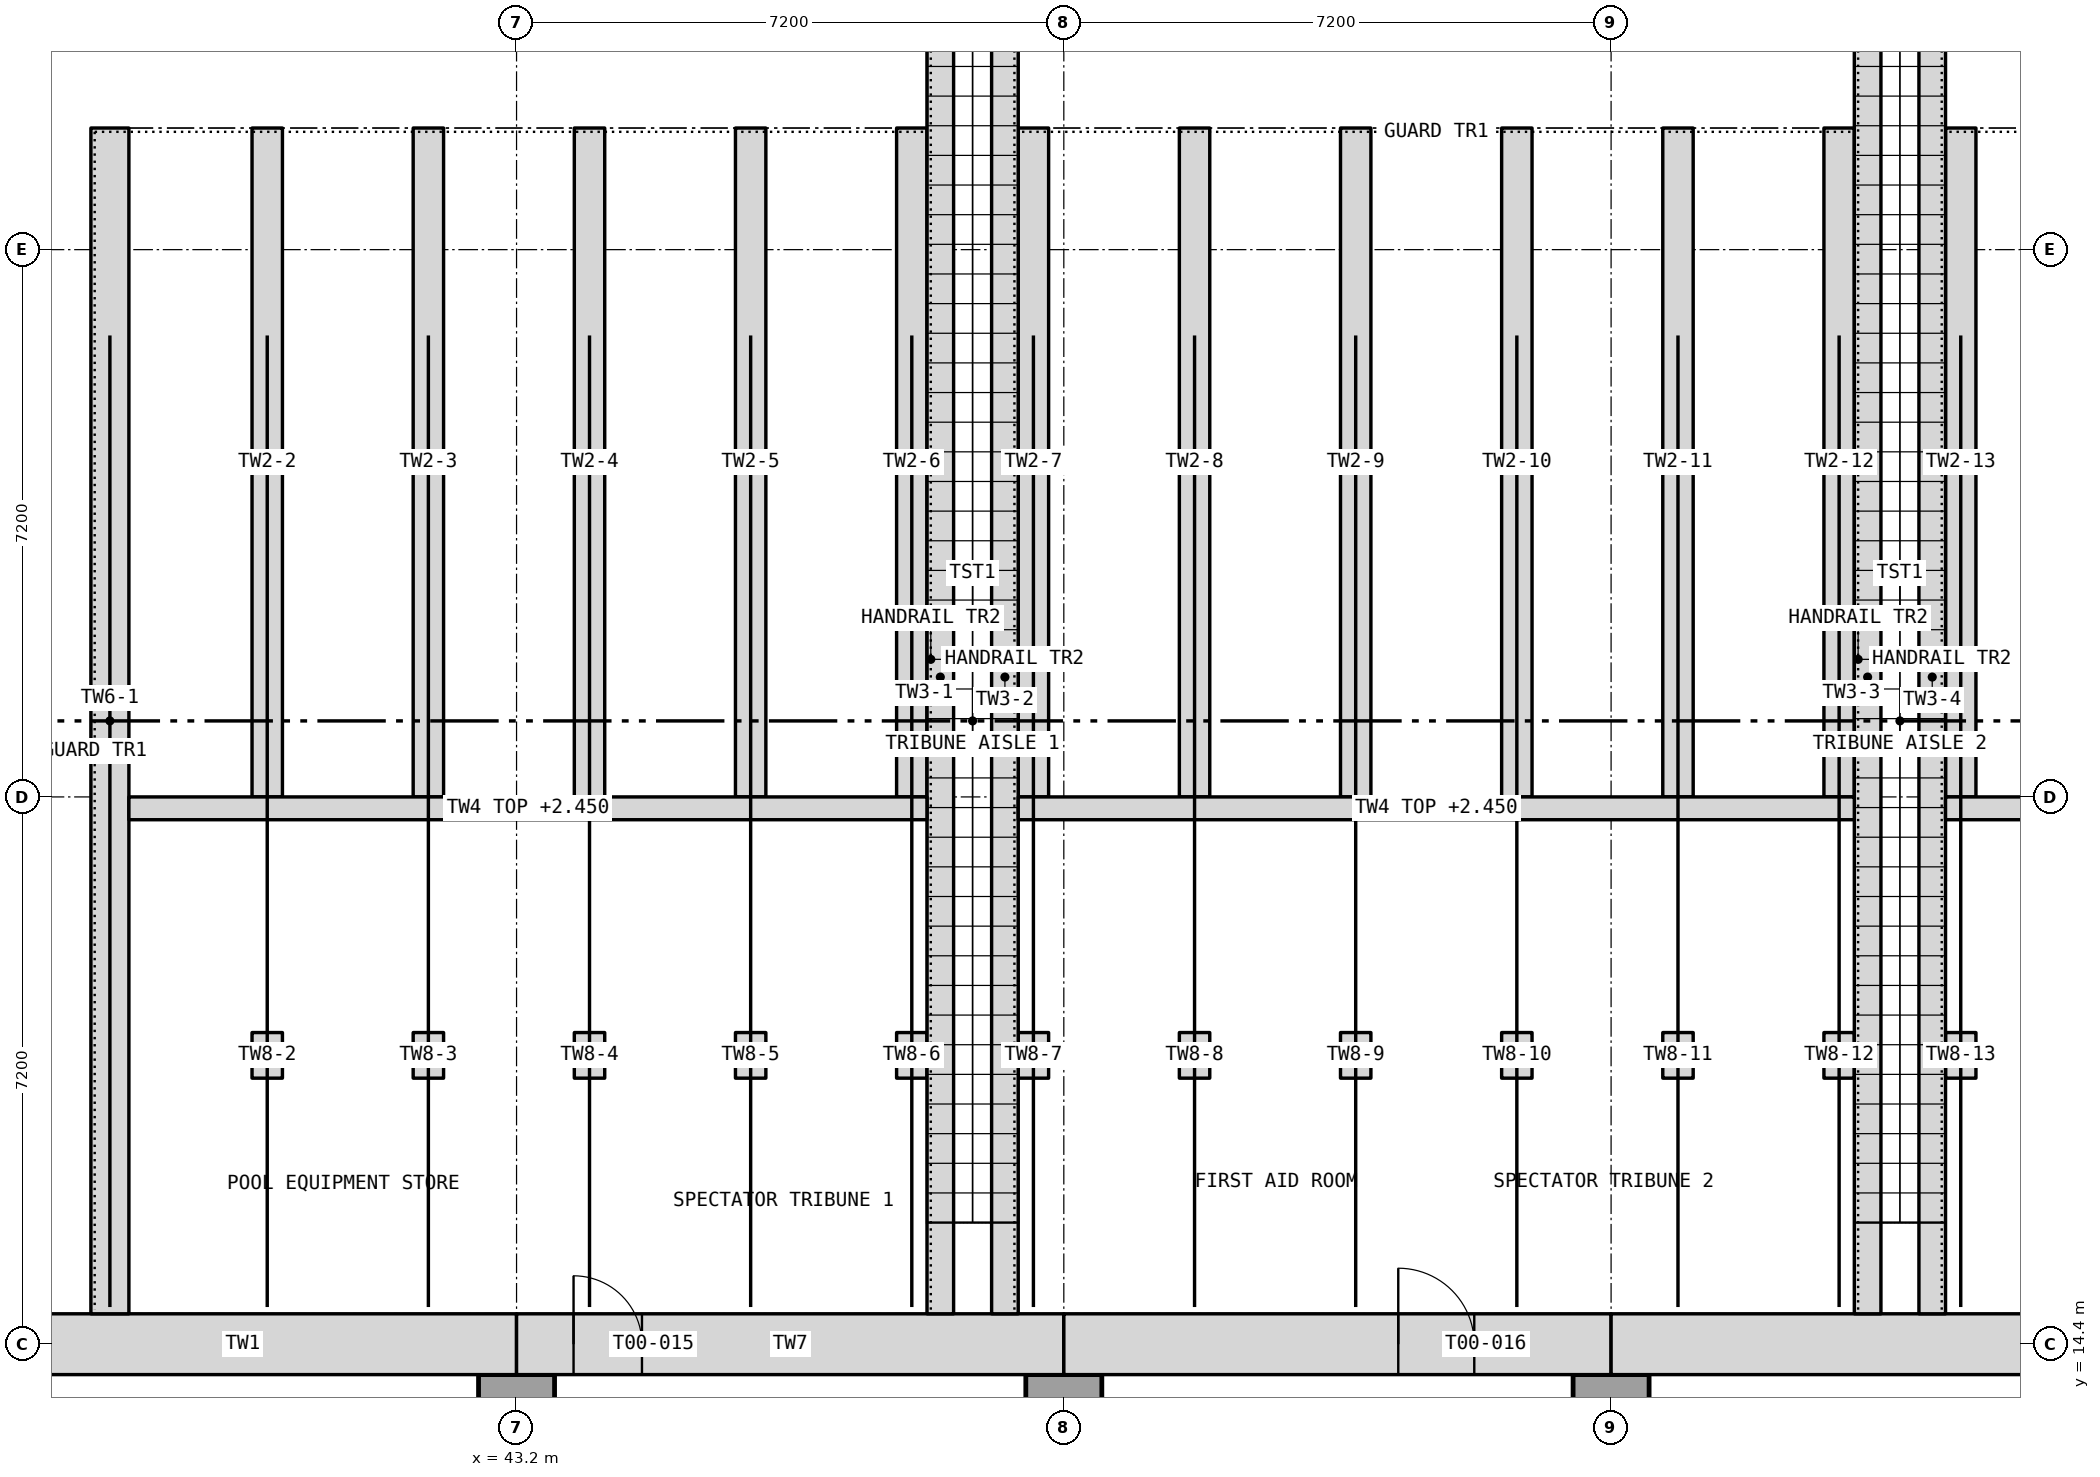
"""IFC4 building model, lengths in metres.
Left out: names, types, materials, properties, quantities, classifications, styles, units other than length and angle.
Written with IfcOpenShell. Run it as: python <this file> out.ifc"""

import sys

from ifc_helpers import new_model, si_unit, direction, frame, frame_2d, origin, place, context, subcontext, project, spatial, polyline, rectangle, outline, extrude, element, fill, save


model = new_model("IFC4")
c1 = context("Model", 3, precision=1e-05, world=origin(), true_north=direction((0.0, 1.0)))
c2 = subcontext(c1, "Body", "Model", "MODEL_VIEW")
j1 = project(units=[si_unit("LENGTHUNIT", "METRE"), si_unit("PLANEANGLEUNIT", "RADIAN")], contexts=[c1])
p1 = place(None, origin())
s1 = spatial("IfcSite", under=j1, at=p1, CompositionType="ELEMENT")
p2 = place(p1, origin())
s2 = spatial("IfcBuilding", under=s1, at=p2, CompositionType="ELEMENT")
p3 = place(p2, origin())
s3 = spatial("IfcBuildingStorey", under=s2, at=p3, CompositionType="ELEMENT", Elevation=0.0)
for number, where, z_axis, x_axis in (
    (1, (43.2, 11.4, 0.0), (0.0, 0.0, 1.0), (0.0, 1.0, 0.0)),
    (2, (50.4, 11.4, 0.0), (0.0, 0.0, 1.0), (0.0, 1.0, 0.0)),
):
    element("IfcWall", number, at=place(p3, frame(where, z_axis=z_axis, x_axis=x_axis)), inside=s3, PredefinedType="SOLIDWALL", context=c2, shape_type="SweptSolid", body=[
        extrude(rectangle(XDim=2.6, YDim=1.0, at=frame_2d((1.3, 0.0))), origin(), (0.0, 0.0, 1.0), 6.0),
    ])
p4 = place(p3, frame((57.6, 11.3, 0.0), z_axis=(0.0, 0.0, 1.0), x_axis=(0.0, 1.0, 0.0)))
e3 = element("IfcWall", 3, at=p4, inside=s3, PredefinedType="SOLIDWALL", context=c2, shape_type="SweptSolid", body=[
    extrude(rectangle(XDim=2.7, YDim=1.0, at=frame_2d((1.35, 0.0))), origin(), (0.0, 0.0, 1.0), 6.0),
])
p5 = place(p3, frame((36.0, 14.4, 0.0), z_axis=(0.0, 0.0, 1.0), x_axis=(1.0, 0.0, 0.0)))
e4 = element("IfcWall", 4, at=p5, inside=s3, PredefinedType="SOLIDWALL", context=c2, shape_type="SweptSolid", body=[
    extrude(rectangle(XDim=7.2, YDim=0.8, at=frame_2d((3.6, 0.0))), origin(), (0.0, 0.0, 1.0), 6.0),
])
p6 = place(p3, frame((43.2, 14.4, 0.0), z_axis=(0.0, 0.0, 1.0), x_axis=(1.0, 0.0, 0.0)))
e5 = element("IfcWall", 5, at=p6, inside=s3, PredefinedType="SOLIDWALL", context=c2, shape_type="SweptSolid", body=[
    extrude(rectangle(XDim=7.2, YDim=0.8, at=frame_2d((3.6, 0.0))), origin(), (0.0, 0.0, 1.0), 6.0),
])
p7 = place(p6, frame((0.75, 0.0, 0.0)))
e6 = element("IfcOpeningElement", 6, at=p7, cuts=e5, PredefinedType="OPENING", context=c2, shape_type="SweptSolid", body=[
    extrude(rectangle(XDim=0.9, YDim=2.1, at=frame_2d((0.45, 1.05))), frame((0.0, 0.41, 0.0), z_axis=(0.0, -1.0, 0.0), x_axis=(1.0, 0.0, 0.0)), (0.0, 0.0, 1.0), 0.82),
])
p8 = place(p3, frame((50.4, 14.4, 0.0), z_axis=(0.0, 0.0, 1.0), x_axis=(1.0, 0.0, 0.0)))
e7 = element("IfcWall", 7, at=p8, inside=s3, PredefinedType="SOLIDWALL", context=c2, shape_type="SweptSolid", body=[
    extrude(rectangle(XDim=7.2, YDim=0.8, at=frame_2d((3.6, 0.0))), origin(), (0.0, 0.0, 1.0), 6.0),
])
p9 = place(p8, frame((4.4, 0.0, 0.0)))
e8 = element("IfcOpeningElement", 8, at=p9, cuts=e7, PredefinedType="OPENING", context=c2, shape_type="SweptSolid", body=[
    extrude(rectangle(XDim=1.0, YDim=2.1, at=frame_2d((0.5, 1.05))), frame((0.0, 0.41, 0.0), z_axis=(0.0, -1.0, 0.0), x_axis=(1.0, 0.0, 0.0)), (0.0, 0.0, 1.0), 0.82),
])
p10 = place(p3, frame((57.6, 14.4, 0.0), z_axis=(0.0, 0.0, 1.0), x_axis=(1.0, 0.0, 0.0)))
e9 = element("IfcWall", 9, at=p10, inside=s3, PredefinedType="SOLIDWALL", context=c2, shape_type="SweptSolid", body=[
    extrude(rectangle(XDim=7.2, YDim=0.8, at=frame_2d((3.6, 0.0))), origin(), (0.0, 0.0, 1.0), 6.0),
])
p11 = place(p3, frame((37.85, 30.4, 0.0), z_axis=(0.0, 0.0, 1.0), x_axis=(0.0, -1.0, 0.0)))
e10 = element("IfcWall", 10, at=p11, inside=s3, PredefinedType="SOLIDWALL", context=c2, shape_type="SweptSolid", body=[
    extrude(outline(polyline([(0.0, 0.0), (15.6, 0.0), (15.6, 4.937), (2.6, 0.175), (2.6, 0.974), (0.0, 0.021), (0.0, 0.0)])), frame((0.0, 0.25, 0.0), z_axis=(0.0, -1.0, 0.0), x_axis=(1.0, 0.0, 0.0)), (0.0, 0.0, 1.0), 0.5),
])
p12 = place(p3, frame((39.92, 30.4, 0.0), z_axis=(0.0, 0.0, 1.0), x_axis=(0.0, -1.0, 0.0)))
e11 = element("IfcWall", 11, at=p12, inside=s3, PredefinedType="SOLIDWALL", context=c2, shape_type="SweptSolid", body=[
    extrude(outline(polyline([(0.0, 0.0), (8.8, 0.0), (8.8, 2.446), (2.6, 0.175), (2.6, 0.974), (0.0, 0.021), (0.0, 0.0)])), frame((0.0, 0.2, 0.0), z_axis=(0.0, -1.0, 0.0), x_axis=(1.0, 0.0, 0.0)), (0.0, 0.0, 1.0), 0.4),
])
p13 = place(p3, frame((39.92, 18.5, 0.0), z_axis=(0.0, 0.0, 1.0), x_axis=(0.0, -1.0, 0.0)))
e12 = element("IfcWall", 12, at=p13, inside=s3, PredefinedType="SOLIDWALL", context=c2, shape_type="SweptSolid", body=[
    extrude(outline(polyline([(0.0, 0.0), (0.6, 0.0), (0.6, 3.802), (0.0, 3.582), (0.0, 0.0)])), frame((0.0, 0.2, 0.0), z_axis=(0.0, -1.0, 0.0), x_axis=(1.0, 0.0, 0.0)), (0.0, 0.0, 1.0), 0.4),
])
p14 = place(p3, frame((42.04, 30.4, 0.0), z_axis=(0.0, 0.0, 1.0), x_axis=(0.0, -1.0, 0.0)))
e13 = element("IfcWall", 13, at=p14, inside=s3, PredefinedType="SOLIDWALL", context=c2, shape_type="SweptSolid", body=[
    extrude(outline(polyline([(0.0, 0.0), (8.8, 0.0), (8.8, 2.446), (2.6, 0.175), (2.6, 0.974), (0.0, 0.021), (0.0, 0.0)])), frame((0.0, 0.2, 0.0), z_axis=(0.0, -1.0, 0.0), x_axis=(1.0, 0.0, 0.0)), (0.0, 0.0, 1.0), 0.4),
])
p15 = place(p3, frame((42.04, 18.5, 0.0), z_axis=(0.0, 0.0, 1.0), x_axis=(0.0, -1.0, 0.0)))
e14 = element("IfcWall", 14, at=p15, inside=s3, PredefinedType="SOLIDWALL", context=c2, shape_type="SweptSolid", body=[
    extrude(outline(polyline([(0.0, 0.0), (0.6, 0.0), (0.6, 3.802), (0.0, 3.582), (0.0, 0.0)])), frame((0.0, 0.2, 0.0), z_axis=(0.0, -1.0, 0.0), x_axis=(1.0, 0.0, 0.0)), (0.0, 0.0, 1.0), 0.4),
])
p16 = place(p3, frame((44.16, 30.4, 0.0), z_axis=(0.0, 0.0, 1.0), x_axis=(0.0, -1.0, 0.0)))
e15 = element("IfcWall", 15, at=p16, inside=s3, PredefinedType="SOLIDWALL", context=c2, shape_type="SweptSolid", body=[
    extrude(outline(polyline([(0.0, 0.0), (8.8, 0.0), (8.8, 2.446), (2.6, 0.175), (2.6, 0.974), (0.0, 0.021), (0.0, 0.0)])), frame((0.0, 0.2, 0.0), z_axis=(0.0, -1.0, 0.0), x_axis=(1.0, 0.0, 0.0)), (0.0, 0.0, 1.0), 0.4),
])
p17 = place(p3, frame((44.16, 18.5, 0.0), z_axis=(0.0, 0.0, 1.0), x_axis=(0.0, -1.0, 0.0)))
e16 = element("IfcWall", 16, at=p17, inside=s3, PredefinedType="SOLIDWALL", context=c2, shape_type="SweptSolid", body=[
    extrude(outline(polyline([(0.0, 0.0), (0.6, 0.0), (0.6, 3.802), (0.0, 3.582), (0.0, 0.0)])), frame((0.0, 0.2, 0.0), z_axis=(0.0, -1.0, 0.0), x_axis=(1.0, 0.0, 0.0)), (0.0, 0.0, 1.0), 0.4),
])
p18 = place(p3, frame((46.28, 30.4, 0.0), z_axis=(0.0, 0.0, 1.0), x_axis=(0.0, -1.0, 0.0)))
e17 = element("IfcWall", 17, at=p18, inside=s3, PredefinedType="SOLIDWALL", context=c2, shape_type="SweptSolid", body=[
    extrude(outline(polyline([(0.0, 0.0), (8.8, 0.0), (8.8, 2.446), (2.6, 0.175), (2.6, 0.974), (0.0, 0.021), (0.0, 0.0)])), frame((0.0, 0.2, 0.0), z_axis=(0.0, -1.0, 0.0), x_axis=(1.0, 0.0, 0.0)), (0.0, 0.0, 1.0), 0.4),
])
p19 = place(p3, frame((46.28, 18.5, 0.0), z_axis=(0.0, 0.0, 1.0), x_axis=(0.0, -1.0, 0.0)))
e18 = element("IfcWall", 18, at=p19, inside=s3, PredefinedType="SOLIDWALL", context=c2, shape_type="SweptSolid", body=[
    extrude(outline(polyline([(0.0, 0.0), (0.6, 0.0), (0.6, 3.802), (0.0, 3.582), (0.0, 0.0)])), frame((0.0, 0.2, 0.0), z_axis=(0.0, -1.0, 0.0), x_axis=(1.0, 0.0, 0.0)), (0.0, 0.0, 1.0), 0.4),
])
p20 = place(p3, frame((48.4, 30.4, 0.0), z_axis=(0.0, 0.0, 1.0), x_axis=(0.0, -1.0, 0.0)))
e19 = element("IfcWall", 19, at=p20, inside=s3, PredefinedType="SOLIDWALL", context=c2, shape_type="SweptSolid", body=[
    extrude(outline(polyline([(0.0, 0.0), (8.8, 0.0), (8.8, 2.446), (2.6, 0.175), (2.6, 0.974), (0.0, 0.021), (0.0, 0.0)])), frame((0.0, 0.2, 0.0), z_axis=(0.0, -1.0, 0.0), x_axis=(1.0, 0.0, 0.0)), (0.0, 0.0, 1.0), 0.4),
])
p21 = place(p3, frame((48.4, 18.5, 0.0), z_axis=(0.0, 0.0, 1.0), x_axis=(0.0, -1.0, 0.0)))
e20 = element("IfcWall", 20, at=p21, inside=s3, PredefinedType="SOLIDWALL", context=c2, shape_type="SweptSolid", body=[
    extrude(outline(polyline([(0.0, 0.0), (0.6, 0.0), (0.6, 3.802), (0.0, 3.582), (0.0, 0.0)])), frame((0.0, 0.2, 0.0), z_axis=(0.0, -1.0, 0.0), x_axis=(1.0, 0.0, 0.0)), (0.0, 0.0, 1.0), 0.4),
])
p22 = place(p3, frame((50.0, 30.4, 0.0), z_axis=(0.0, 0.0, 1.0), x_axis=(0.0, -1.0, 0.0)))
e21 = element("IfcWall", 21, at=p22, inside=s3, PredefinedType="SOLIDWALL", context=c2, shape_type="SweptSolid", body=[
    extrude(outline(polyline([(0.0, 0.0), (8.8, 0.0), (8.8, 2.446), (2.6, 0.175), (2.6, 0.974), (0.0, 0.021), (0.0, 0.0)])), frame((0.0, 0.2, 0.0), z_axis=(0.0, -1.0, 0.0), x_axis=(1.0, 0.0, 0.0)), (0.0, 0.0, 1.0), 0.4),
])
p23 = place(p3, frame((50.0, 18.5, 0.0), z_axis=(0.0, 0.0, 1.0), x_axis=(0.0, -1.0, 0.0)))
e22 = element("IfcWall", 22, at=p23, inside=s3, PredefinedType="SOLIDWALL", context=c2, shape_type="SweptSolid", body=[
    extrude(outline(polyline([(0.0, 0.0), (0.6, 0.0), (0.6, 3.802), (0.0, 3.582), (0.0, 0.0)])), frame((0.0, 0.2, 0.0), z_axis=(0.0, -1.0, 0.0), x_axis=(1.0, 0.0, 0.0)), (0.0, 0.0, 1.0), 0.4),
])
p24 = place(p3, frame((52.12, 30.4, 0.0), z_axis=(0.0, 0.0, 1.0), x_axis=(0.0, -1.0, 0.0)))
e23 = element("IfcWall", 23, at=p24, inside=s3, PredefinedType="SOLIDWALL", context=c2, shape_type="SweptSolid", body=[
    extrude(outline(polyline([(0.0, 0.0), (8.8, 0.0), (8.8, 2.446), (2.6, 0.175), (2.6, 0.974), (0.0, 0.021), (0.0, 0.0)])), frame((0.0, 0.2, 0.0), z_axis=(0.0, -1.0, 0.0), x_axis=(1.0, 0.0, 0.0)), (0.0, 0.0, 1.0), 0.4),
])
p25 = place(p3, frame((52.12, 18.5, 0.0), z_axis=(0.0, 0.0, 1.0), x_axis=(0.0, -1.0, 0.0)))
e24 = element("IfcWall", 24, at=p25, inside=s3, PredefinedType="SOLIDWALL", context=c2, shape_type="SweptSolid", body=[
    extrude(outline(polyline([(0.0, 0.0), (0.6, 0.0), (0.6, 3.802), (0.0, 3.582), (0.0, 0.0)])), frame((0.0, 0.2, 0.0), z_axis=(0.0, -1.0, 0.0), x_axis=(1.0, 0.0, 0.0)), (0.0, 0.0, 1.0), 0.4),
])
p26 = place(p3, frame((54.24, 30.4, 0.0), z_axis=(0.0, 0.0, 1.0), x_axis=(0.0, -1.0, 0.0)))
e25 = element("IfcWall", 25, at=p26, inside=s3, PredefinedType="SOLIDWALL", context=c2, shape_type="SweptSolid", body=[
    extrude(outline(polyline([(0.0, 0.0), (8.8, 0.0), (8.8, 2.446), (2.6, 0.175), (2.6, 0.974), (0.0, 0.021), (0.0, 0.0)])), frame((0.0, 0.2, 0.0), z_axis=(0.0, -1.0, 0.0), x_axis=(1.0, 0.0, 0.0)), (0.0, 0.0, 1.0), 0.4),
])
p27 = place(p3, frame((54.24, 18.5, 0.0), z_axis=(0.0, 0.0, 1.0), x_axis=(0.0, -1.0, 0.0)))
e26 = element("IfcWall", 26, at=p27, inside=s3, PredefinedType="SOLIDWALL", context=c2, shape_type="SweptSolid", body=[
    extrude(outline(polyline([(0.0, 0.0), (0.6, 0.0), (0.6, 3.802), (0.0, 3.582), (0.0, 0.0)])), frame((0.0, 0.2, 0.0), z_axis=(0.0, -1.0, 0.0), x_axis=(1.0, 0.0, 0.0)), (0.0, 0.0, 1.0), 0.4),
])
p28 = place(p3, frame((56.36, 30.4, 0.0), z_axis=(0.0, 0.0, 1.0), x_axis=(0.0, -1.0, 0.0)))
e27 = element("IfcWall", 27, at=p28, inside=s3, PredefinedType="SOLIDWALL", context=c2, shape_type="SweptSolid", body=[
    extrude(outline(polyline([(0.0, 0.0), (8.8, 0.0), (8.8, 2.446), (2.6, 0.175), (2.6, 0.974), (0.0, 0.021), (0.0, 0.0)])), frame((0.0, 0.2, 0.0), z_axis=(0.0, -1.0, 0.0), x_axis=(1.0, 0.0, 0.0)), (0.0, 0.0, 1.0), 0.4),
])
p29 = place(p3, frame((56.36, 18.5, 0.0), z_axis=(0.0, 0.0, 1.0), x_axis=(0.0, -1.0, 0.0)))
e28 = element("IfcWall", 28, at=p29, inside=s3, PredefinedType="SOLIDWALL", context=c2, shape_type="SweptSolid", body=[
    extrude(outline(polyline([(0.0, 0.0), (0.6, 0.0), (0.6, 3.802), (0.0, 3.582), (0.0, 0.0)])), frame((0.0, 0.2, 0.0), z_axis=(0.0, -1.0, 0.0), x_axis=(1.0, 0.0, 0.0)), (0.0, 0.0, 1.0), 0.4),
])
p30 = place(p3, frame((58.48, 30.4, 0.0), z_axis=(0.0, 0.0, 1.0), x_axis=(0.0, -1.0, 0.0)))
e29 = element("IfcWall", 29, at=p30, inside=s3, PredefinedType="SOLIDWALL", context=c2, shape_type="SweptSolid", body=[
    extrude(outline(polyline([(0.0, 0.0), (8.8, 0.0), (8.8, 2.446), (2.6, 0.175), (2.6, 0.974), (0.0, 0.021), (0.0, 0.0)])), frame((0.0, 0.2, 0.0), z_axis=(0.0, -1.0, 0.0), x_axis=(1.0, 0.0, 0.0)), (0.0, 0.0, 1.0), 0.4),
])
p31 = place(p3, frame((58.48, 18.5, 0.0), z_axis=(0.0, 0.0, 1.0), x_axis=(0.0, -1.0, 0.0)))
e30 = element("IfcWall", 30, at=p31, inside=s3, PredefinedType="SOLIDWALL", context=c2, shape_type="SweptSolid", body=[
    extrude(outline(polyline([(0.0, 0.0), (0.6, 0.0), (0.6, 3.802), (0.0, 3.582), (0.0, 0.0)])), frame((0.0, 0.2, 0.0), z_axis=(0.0, -1.0, 0.0), x_axis=(1.0, 0.0, 0.0)), (0.0, 0.0, 1.0), 0.4),
])
p32 = place(p3, frame((60.6, 30.4, 0.0), z_axis=(0.0, 0.0, 1.0), x_axis=(0.0, -1.0, 0.0)))
e31 = element("IfcWall", 31, at=p32, inside=s3, PredefinedType="SOLIDWALL", context=c2, shape_type="SweptSolid", body=[
    extrude(outline(polyline([(0.0, 0.0), (8.8, 0.0), (8.8, 2.446), (2.6, 0.175), (2.6, 0.974), (0.0, 0.021), (0.0, 0.0)])), frame((0.0, 0.2, 0.0), z_axis=(0.0, -1.0, 0.0), x_axis=(1.0, 0.0, 0.0)), (0.0, 0.0, 1.0), 0.4),
])
p33 = place(p3, frame((60.6, 18.5, 0.0), z_axis=(0.0, 0.0, 1.0), x_axis=(0.0, -1.0, 0.0)))
e32 = element("IfcWall", 32, at=p33, inside=s3, PredefinedType="SOLIDWALL", context=c2, shape_type="SweptSolid", body=[
    extrude(outline(polyline([(0.0, 0.0), (0.6, 0.0), (0.6, 3.802), (0.0, 3.582), (0.0, 0.0)])), frame((0.0, 0.2, 0.0), z_axis=(0.0, -1.0, 0.0), x_axis=(1.0, 0.0, 0.0)), (0.0, 0.0, 1.0), 0.4),
])
p34 = place(p3, frame((62.2, 30.4, 0.0), z_axis=(0.0, 0.0, 1.0), x_axis=(0.0, -1.0, 0.0)))
e33 = element("IfcWall", 33, at=p34, inside=s3, PredefinedType="SOLIDWALL", context=c2, shape_type="SweptSolid", body=[
    extrude(outline(polyline([(0.0, 0.0), (8.8, 0.0), (8.8, 2.446), (2.6, 0.175), (2.6, 0.974), (0.0, 0.021), (0.0, 0.0)])), frame((0.0, 0.2, 0.0), z_axis=(0.0, -1.0, 0.0), x_axis=(1.0, 0.0, 0.0)), (0.0, 0.0, 1.0), 0.4),
])
p35 = place(p3, frame((62.2, 18.5, 0.0), z_axis=(0.0, 0.0, 1.0), x_axis=(0.0, -1.0, 0.0)))
e34 = element("IfcWall", 34, at=p35, inside=s3, PredefinedType="SOLIDWALL", context=c2, shape_type="SweptSolid", body=[
    extrude(outline(polyline([(0.0, 0.0), (0.6, 0.0), (0.6, 3.802), (0.0, 3.582), (0.0, 0.0)])), frame((0.0, 0.2, 0.0), z_axis=(0.0, -1.0, 0.0), x_axis=(1.0, 0.0, 0.0)), (0.0, 0.0, 1.0), 0.4),
])
for number, where, z_axis, x_axis in (
    (35, (48.775, 31.554, 0.0), (0.0, 0.0, 1.0), (0.0, -1.0, 0.0)),
    (36, (49.625, 31.554, 0.0), (0.0, 0.0, 1.0), (0.0, -1.0, 0.0)),
    (37, (60.975, 31.554, 0.0), (0.0, 0.0, 1.0), (0.0, -1.0, 0.0)),
    (38, (61.825, 31.554, 0.0), (0.0, 0.0, 1.0), (0.0, -1.0, 0.0)),
):
    element("IfcWall", number, at=place(p3, frame(where, z_axis=z_axis, x_axis=x_axis)), inside=s3, PredefinedType="SOLIDWALL", context=c2, shape_type="SweptSolid", body=[
        extrude(outline(polyline([(0.0, 0.0), (16.754, 0.0), (16.754, 5.8), (15.554, 5.8), (15.554, 5.698), (0.0, 0.0), (0.0, 0.0)])), frame((0.0, 0.175, 0.0), z_axis=(0.0, -1.0, 0.0), x_axis=(1.0, 0.0, 0.0)), (0.0, 0.0, 1.0), 0.35),
    ])
p36 = place(p3, frame((38.1, 21.45, 0.0), z_axis=(0.0, 0.0, 1.0), x_axis=(1.0, 0.0, 0.0)))
e39 = element("IfcWall", 39, at=p36, inside=s3, PredefinedType="PARTITIONING", context=c2, shape_type="SweptSolid", body=[
    extrude(rectangle(XDim=10.5, YDim=0.3, at=frame_2d((5.25, 0.0))), origin(), (0.0, 0.0, 1.0), 2.45),
])
for number, where, z_axis, x_axis in (
    (40, (49.8, 21.45, 0.0), (0.0, 0.0, 1.0), (1.0, 0.0, 0.0)),
    (41, (62.0, 21.45, 0.0), (0.0, 0.0, 1.0), (1.0, 0.0, 0.0)),
):
    element("IfcWall", number, at=place(p3, frame(where, z_axis=z_axis, x_axis=x_axis)), inside=s3, PredefinedType="PARTITIONING", context=c2, shape_type="SweptSolid", body=[
        extrude(rectangle(XDim=11.0, YDim=0.3, at=frame_2d((5.5, 0.0))), origin(), (0.0, 0.0, 1.0), 2.45),
    ])
p37 = place(p7, origin())
e42 = element("IfcDoor", 42, at=p37, inside=s3, OperationType="SINGLE_SWING_LEFT", PredefinedType="DOOR", context=c2, shape_type="SweptSolid", body=[
    extrude(rectangle(XDim=0.9, YDim=2.1, at=frame_2d((0.45, 1.05))), frame((0.0, 0.025, 0.0), z_axis=(0.0, -1.0, 0.0), x_axis=(1.0, 0.0, 0.0)), (0.0, 0.0, 1.0), 0.05),
])
fill(e6, e42)
p38 = place(p9, origin())
e43 = element("IfcDoor", 43, at=p38, inside=s3, OperationType="SINGLE_SWING_LEFT", PredefinedType="DOOR", context=c2, shape_type="SweptSolid", body=[
    extrude(rectangle(XDim=1.0, YDim=2.1, at=frame_2d((0.5, 1.05))), frame((0.0, 0.025, 0.0), z_axis=(0.0, -1.0, 0.0), x_axis=(1.0, 0.0, 0.0)), (0.0, 0.0, 1.0), 0.05),
])
fill(e8, e43)
save(model, sys.argv[1])
